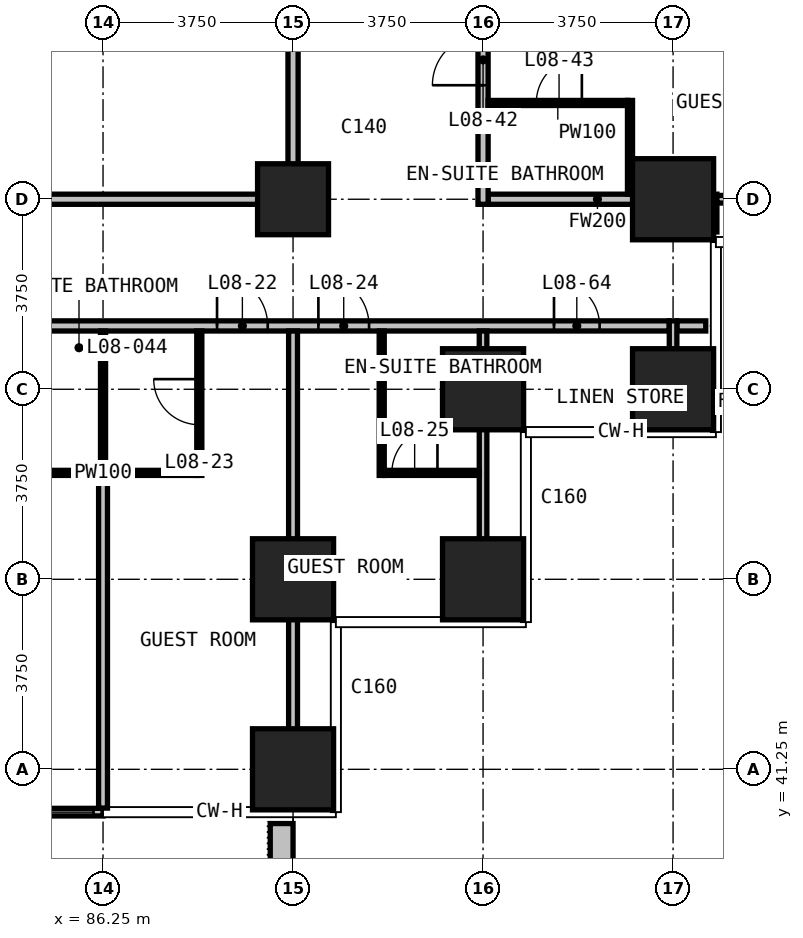
"""IFC4 building model, lengths in metres.
Left out: names, types, materials, properties, quantities, classifications, styles, units other than length and angle.
Written with IfcOpenShell. Run it as: python <this file> out.ifc"""

import sys

from ifc_helpers import new_model, si_unit, direction, frame, frame_2d, origin, origin_2d, place, context, subcontext, project, spatial, rectangle, extrude, element, fill, save


model = new_model("IFC4")
c1 = context("Model", 3, precision=1e-05, world=origin(), true_north=direction((0.0, 1.0)))
c2 = subcontext(c1, "Body", "Model", "MODEL_VIEW")
j1 = project(units=[si_unit("LENGTHUNIT", "METRE"), si_unit("PLANEANGLEUNIT", "RADIAN")], contexts=[c1])
p1 = place(None, origin())
s1 = spatial("IfcSite", under=j1, at=p1, CompositionType="ELEMENT")
p2 = place(p1, origin())
s2 = spatial("IfcBuilding", under=s1, at=p2, CompositionType="ELEMENT")
p3 = place(p2, frame((0.0, 0.0, 46.1)))
s3 = spatial("IfcBuildingStorey", under=s2, at=p3, CompositionType="ELEMENT", Elevation=46.1)
for number, where, z_axis, x_axis in (
    (1, (90.0, 41.25, 0.0), (0.0, 0.0, 1.0), (1.0, 0.0, 0.0)),
    (2, (90.0, 45.0, 0.0), (0.0, 0.0, 1.0), (1.0, 0.0, 0.0)),
):
    element("IfcColumn", number, at=place(p3, frame(where, z_axis=z_axis, x_axis=x_axis)), inside=s3, PredefinedType="COLUMN", context=c2, shape_type="SweptSolid", body=[
        extrude(rectangle(XDim=1.6, YDim=1.6, at=origin_2d()), origin(), (0.0, 0.0, 1.0), 3.3),
    ])
p4 = place(p3, frame((90.0, 52.5, 0.0), z_axis=(0.0, 0.0, 1.0), x_axis=(1.0, 0.0, 0.0)))
e3 = element("IfcColumn", 3, at=p4, inside=s3, PredefinedType="COLUMN", context=c2, shape_type="SweptSolid", body=[
    extrude(rectangle(XDim=1.4, YDim=1.4, at=origin_2d()), origin(), (0.0, 0.0, 1.0), 3.3),
])
for number, where, z_axis, x_axis in (
    (4, (93.75, 45.0, 0.0), (0.0, 0.0, 1.0), (1.0, 0.0, 0.0)),
    (5, (93.75, 48.75, 0.0), (0.0, 0.0, 1.0), (1.0, 0.0, 0.0)),
    (6, (97.5, 48.75, 0.0), (0.0, 0.0, 1.0), (1.0, 0.0, 0.0)),
    (7, (97.5, 52.5, 0.0), (0.0, 0.0, 1.0), (1.0, 0.0, 0.0)),
):
    element("IfcColumn", number, at=place(p3, frame(where, z_axis=z_axis, x_axis=x_axis)), inside=s3, PredefinedType="COLUMN", context=c2, shape_type="SweptSolid", body=[
        extrude(rectangle(XDim=1.6, YDim=1.6, at=origin_2d()), origin(), (0.0, 0.0, 1.0), 3.3),
    ])
p5 = place(p3, frame((82.5, 40.405, 0.0), z_axis=(0.0, 0.0, 1.0), x_axis=(1.0, 0.0, 0.0)))
e8 = element("IfcWall", 8, at=p5, inside=s3, PredefinedType="SOLIDWALL", context=c2, shape_type="SweptSolid", body=[
    extrude(rectangle(XDim=3.75, YDim=0.15, at=frame_2d((1.875, 0.0))), origin(), (0.0, 0.0, 1.0), 3.0),
])
p6 = place(p5, frame((1.275, 0.0, 0.0)))
e9 = element("IfcOpeningElement", 9, at=p6, cuts=e8, PredefinedType="OPENING", context=c2, shape_type="SweptSolid", body=[
    extrude(rectangle(XDim=1.2, YDim=2.4, at=frame_2d((0.6, 1.2))), frame((0.0, 0.085, 0.0), z_axis=(0.0, -1.0, 0.0), x_axis=(1.0, 0.0, 0.0)), (0.0, 0.0, 1.0), 0.17),
])
p7 = place(p5, frame((2.663, 0.0, 0.1)))
e10 = element("IfcOpeningElement", 10, at=p7, cuts=e8, PredefinedType="OPENING", context=c2, shape_type="SweptSolid", body=[
    extrude(rectangle(XDim=0.9, YDim=2.4, at=frame_2d((0.45, 1.2))), frame((0.0, 0.085, 0.0), z_axis=(0.0, -1.0, 0.0), x_axis=(1.0, 0.0, 0.0)), (0.0, 0.0, 1.0), 0.17),
])
p8 = place(p3, frame((89.775, 40.18, 0.0), z_axis=(0.0, 0.0, 1.0), x_axis=(0.0, -1.0, 0.0)))
e11 = element("IfcWall", 11, at=p8, inside=s3, PredefinedType="USERDEFINED", context=c2, shape_type="SweptSolid", body=[
    extrude(rectangle(XDim=2.33, YDim=0.45, at=frame_2d((1.165, 0.0))), origin(), (0.0, 0.0, 1.0), 1.1),
])
p9 = place(p3, frame((52.575, 50.0, 0.0), z_axis=(0.0, 0.0, 1.0), x_axis=(1.0, 0.0, 0.0)))
e12 = element("IfcWall", 12, at=p9, inside=s3, PredefinedType="PARTITIONING", context=c2, shape_type="SweptSolid", body=[
    extrude(rectangle(XDim=44.85, YDim=0.2, at=frame_2d((22.425, 0.0))), origin(), (0.0, 0.0, 1.0), 3.0),
])
p10 = place(p9, frame((5.925, 0.0, 0.0)))
e13 = element("IfcOpeningElement", 13, at=p10, cuts=e12, PredefinedType="OPENING", context=c2, shape_type="SweptSolid", body=[
    extrude(rectangle(XDim=1.0, YDim=2.2, at=frame_2d((0.5, 1.1))), frame((0.0, 0.11, 0.0), z_axis=(0.0, -1.0, 0.0), x_axis=(1.0, 0.0, 0.0)), (0.0, 0.0, 1.0), 0.22),
])
p11 = place(p9, frame((7.925, 0.0, 0.0)))
e14 = element("IfcOpeningElement", 14, at=p11, cuts=e12, PredefinedType="OPENING", context=c2, shape_type="SweptSolid", body=[
    extrude(rectangle(XDim=1.0, YDim=2.2, at=frame_2d((0.5, 1.1))), frame((0.0, 0.11, 0.0), z_axis=(0.0, -1.0, 0.0), x_axis=(1.0, 0.0, 0.0)), (0.0, 0.0, 1.0), 0.22),
])
p12 = place(p9, frame((13.425, 0.0, 0.0)))
e15 = element("IfcOpeningElement", 15, at=p12, cuts=e12, PredefinedType="OPENING", context=c2, shape_type="SweptSolid", body=[
    extrude(rectangle(XDim=1.0, YDim=2.2, at=frame_2d((0.5, 1.1))), frame((0.0, 0.11, 0.0), z_axis=(0.0, -1.0, 0.0), x_axis=(1.0, 0.0, 0.0)), (0.0, 0.0, 1.0), 0.22),
])
p13 = place(p9, frame((15.425, 0.0, 0.0)))
e16 = element("IfcOpeningElement", 16, at=p13, cuts=e12, PredefinedType="OPENING", context=c2, shape_type="SweptSolid", body=[
    extrude(rectangle(XDim=1.0, YDim=2.2, at=frame_2d((0.5, 1.1))), frame((0.0, 0.11, 0.0), z_axis=(0.0, -1.0, 0.0), x_axis=(1.0, 0.0, 0.0)), (0.0, 0.0, 1.0), 0.22),
])
p14 = place(p9, frame((20.925, 0.0, 0.0)))
e17 = element("IfcOpeningElement", 17, at=p14, cuts=e12, PredefinedType="OPENING", context=c2, shape_type="SweptSolid", body=[
    extrude(rectangle(XDim=1.0, YDim=2.2, at=frame_2d((0.5, 1.1))), frame((0.0, 0.11, 0.0), z_axis=(0.0, -1.0, 0.0), x_axis=(1.0, 0.0, 0.0)), (0.0, 0.0, 1.0), 0.22),
])
p15 = place(p9, frame((22.925, 0.0, 0.0)))
e18 = element("IfcOpeningElement", 18, at=p15, cuts=e12, PredefinedType="OPENING", context=c2, shape_type="SweptSolid", body=[
    extrude(rectangle(XDim=1.0, YDim=2.2, at=frame_2d((0.5, 1.1))), frame((0.0, 0.11, 0.0), z_axis=(0.0, -1.0, 0.0), x_axis=(1.0, 0.0, 0.0)), (0.0, 0.0, 1.0), 0.22),
])
p16 = place(p9, frame((28.425, 0.0, 0.0)))
e19 = element("IfcOpeningElement", 19, at=p16, cuts=e12, PredefinedType="OPENING", context=c2, shape_type="SweptSolid", body=[
    extrude(rectangle(XDim=1.0, YDim=2.2, at=frame_2d((0.5, 1.1))), frame((0.0, 0.11, 0.0), z_axis=(0.0, -1.0, 0.0), x_axis=(1.0, 0.0, 0.0)), (0.0, 0.0, 1.0), 0.22),
])
p17 = place(p9, frame((30.425, 0.0, 0.0)))
e20 = element("IfcOpeningElement", 20, at=p17, cuts=e12, PredefinedType="OPENING", context=c2, shape_type="SweptSolid", body=[
    extrude(rectangle(XDim=1.0, YDim=2.2, at=frame_2d((0.5, 1.1))), frame((0.0, 0.11, 0.0), z_axis=(0.0, -1.0, 0.0), x_axis=(1.0, 0.0, 0.0)), (0.0, 0.0, 1.0), 0.22),
])
p18 = place(p9, frame((35.925, 0.0, 0.0)))
e21 = element("IfcOpeningElement", 21, at=p18, cuts=e12, PredefinedType="OPENING", context=c2, shape_type="SweptSolid", body=[
    extrude(rectangle(XDim=1.0, YDim=2.2, at=frame_2d((0.5, 1.1))), frame((0.0, 0.11, 0.0), z_axis=(0.0, -1.0, 0.0), x_axis=(1.0, 0.0, 0.0)), (0.0, 0.0, 1.0), 0.22),
])
p19 = place(p9, frame((37.925, 0.0, 0.0)))
e22 = element("IfcOpeningElement", 22, at=p19, cuts=e12, PredefinedType="OPENING", context=c2, shape_type="SweptSolid", body=[
    extrude(rectangle(XDim=1.0, YDim=2.2, at=frame_2d((0.5, 1.1))), frame((0.0, 0.11, 0.0), z_axis=(0.0, -1.0, 0.0), x_axis=(1.0, 0.0, 0.0)), (0.0, 0.0, 1.0), 0.22),
])
p20 = place(p9, frame((1.4, 0.0, 0.0)))
e23 = element("IfcOpeningElement", 23, at=p20, cuts=e12, PredefinedType="OPENING", context=c2, shape_type="SweptSolid", body=[
    extrude(rectangle(XDim=0.9, YDim=2.2, at=frame_2d((0.45, 1.1))), frame((0.0, 0.11, 0.0), z_axis=(0.0, -1.0, 0.0), x_axis=(1.0, 0.0, 0.0)), (0.0, 0.0, 1.0), 0.22),
])
p21 = place(p9, frame((42.575, 0.0, 0.0)))
e24 = element("IfcOpeningElement", 24, at=p21, cuts=e12, PredefinedType="OPENING", context=c2, shape_type="SweptSolid", body=[
    extrude(rectangle(XDim=0.9, YDim=2.2, at=frame_2d((0.45, 1.1))), frame((0.0, 0.11, 0.0), z_axis=(0.0, -1.0, 0.0), x_axis=(1.0, 0.0, 0.0)), (0.0, 0.0, 1.0), 0.22),
])
p22 = place(p3, frame((97.575, 50.0, 0.0), z_axis=(0.0, 0.0, 1.0), x_axis=(1.0, 0.0, 0.0)))
e25 = element("IfcWall", 25, at=p22, inside=s3, PredefinedType="PARTITIONING", context=c2, shape_type="SweptSolid", body=[
    extrude(rectangle(XDim=0.57, YDim=0.2, at=frame_2d((0.285, 0.0))), origin(), (0.0, 0.0, 1.0), 3.0),
])
p23 = place(p3, frame((60.1, 52.5, 0.0), z_axis=(0.0, 0.0, 1.0), x_axis=(1.0, 0.0, 0.0)))
e26 = element("IfcWall", 26, at=p23, inside=s3, PredefinedType="PARTITIONING", context=c2, shape_type="SweptSolid", body=[
    extrude(rectangle(XDim=29.8, YDim=0.2, at=frame_2d((14.9, 0.0))), origin(), (0.0, 0.0, 1.0), 3.0),
])
p24 = place(p23, frame((10.65, 0.0, 0.0)))
e27 = element("IfcOpeningElement", 27, at=p24, cuts=e26, PredefinedType="OPENING", context=c2, shape_type="SweptSolid", body=[
    extrude(rectangle(XDim=1.0, YDim=2.2, at=frame_2d((0.5, 1.1))), frame((0.0, 0.11, 0.0), z_axis=(0.0, -1.0, 0.0), x_axis=(1.0, 0.0, 0.0)), (0.0, 0.0, 1.0), 0.22),
])
p25 = place(p23, frame((18.15, 0.0, 0.0)))
e28 = element("IfcOpeningElement", 28, at=p25, cuts=e26, PredefinedType="OPENING", context=c2, shape_type="SweptSolid", body=[
    extrude(rectangle(XDim=1.0, YDim=2.2, at=frame_2d((0.5, 1.1))), frame((0.0, 0.11, 0.0), z_axis=(0.0, -1.0, 0.0), x_axis=(1.0, 0.0, 0.0)), (0.0, 0.0, 1.0), 0.22),
])
p26 = place(p3, frame((93.85, 52.5, 0.0), z_axis=(0.0, 0.0, 1.0), x_axis=(1.0, 0.0, 0.0)))
e29 = element("IfcWall", 29, at=p26, inside=s3, PredefinedType="PARTITIONING", context=c2, shape_type="SweptSolid", body=[
    extrude(rectangle(XDim=4.315, YDim=0.2, at=frame_2d((2.157, 0.0))), origin(), (0.0, 0.0, 1.0), 3.0),
])
p27 = place(p3, frame((90.0, 52.4, 0.0), z_axis=(0.0, 0.0, 1.0), x_axis=(0.0, 1.0, 0.0)))
e30 = element("IfcWall", 30, at=p27, inside=s3, PredefinedType="PARTITIONING", context=c2, shape_type="SweptSolid", body=[
    extrude(rectangle(XDim=18.84, YDim=0.2, at=frame_2d((9.42, 0.0))), origin(), (0.0, 0.0, 1.0), 3.0),
])
p28 = place(p27, frame((3.35, 0.0, 0.0)))
e31 = element("IfcOpeningElement", 31, at=p28, cuts=e30, PredefinedType="OPENING", context=c2, shape_type="SweptSolid", body=[
    extrude(rectangle(XDim=1.0, YDim=2.2, at=frame_2d((0.5, 1.1))), frame((0.0, 0.11, 0.0), z_axis=(0.0, -1.0, 0.0), x_axis=(1.0, 0.0, 0.0)), (0.0, 0.0, 1.0), 0.22),
])
p29 = place(p27, frame((12.3, 0.0, 0.0)))
e32 = element("IfcOpeningElement", 32, at=p29, cuts=e30, PredefinedType="OPENING", context=c2, shape_type="SweptSolid", body=[
    extrude(rectangle(XDim=1.8, YDim=2.2, at=frame_2d((0.9, 1.1))), frame((0.0, 0.11, 0.0), z_axis=(0.0, -1.0, 0.0), x_axis=(1.0, 0.0, 0.0)), (0.0, 0.0, 1.0), 0.22),
])
p30 = place(p3, frame((93.75, 52.4, 0.0), z_axis=(0.0, 0.0, 1.0), x_axis=(0.0, 1.0, 0.0)))
e33 = element("IfcWall", 33, at=p30, inside=s3, PredefinedType="PARTITIONING", context=c2, shape_type="SweptSolid", body=[
    extrude(rectangle(XDim=33.925, YDim=0.2, at=frame_2d((16.962, 0.0))), origin(), (0.0, 0.0, 1.0), 3.0),
])
p31 = place(p30, frame((2.35, 0.0, 0.0)))
e34 = element("IfcOpeningElement", 34, at=p31, cuts=e33, PredefinedType="OPENING", context=c2, shape_type="SweptSolid", body=[
    extrude(rectangle(XDim=1.0, YDim=2.2, at=frame_2d((0.5, 1.1))), frame((0.0, 0.11, 0.0), z_axis=(0.0, -1.0, 0.0), x_axis=(1.0, 0.0, 0.0)), (0.0, 0.0, 1.0), 0.22),
])
p32 = place(p30, frame((4.35, 0.0, 0.0)))
e35 = element("IfcOpeningElement", 35, at=p32, cuts=e33, PredefinedType="OPENING", context=c2, shape_type="SweptSolid", body=[
    extrude(rectangle(XDim=1.0, YDim=2.2, at=frame_2d((0.5, 1.1))), frame((0.0, 0.11, 0.0), z_axis=(0.0, -1.0, 0.0), x_axis=(1.0, 0.0, 0.0)), (0.0, 0.0, 1.0), 0.22),
])
p33 = place(p30, frame((9.85, 0.0, 0.0)))
e36 = element("IfcOpeningElement", 36, at=p33, cuts=e33, PredefinedType="OPENING", context=c2, shape_type="SweptSolid", body=[
    extrude(rectangle(XDim=1.0, YDim=2.2, at=frame_2d((0.5, 1.1))), frame((0.0, 0.11, 0.0), z_axis=(0.0, -1.0, 0.0), x_axis=(1.0, 0.0, 0.0)), (0.0, 0.0, 1.0), 0.22),
])
p34 = place(p30, frame((11.85, 0.0, 0.0)))
e37 = element("IfcOpeningElement", 37, at=p34, cuts=e33, PredefinedType="OPENING", context=c2, shape_type="SweptSolid", body=[
    extrude(rectangle(XDim=1.0, YDim=2.2, at=frame_2d((0.5, 1.1))), frame((0.0, 0.11, 0.0), z_axis=(0.0, -1.0, 0.0), x_axis=(1.0, 0.0, 0.0)), (0.0, 0.0, 1.0), 0.22),
])
p35 = place(p30, frame((17.35, 0.0, 0.0)))
e38 = element("IfcOpeningElement", 38, at=p35, cuts=e33, PredefinedType="OPENING", context=c2, shape_type="SweptSolid", body=[
    extrude(rectangle(XDim=1.0, YDim=2.2, at=frame_2d((0.5, 1.1))), frame((0.0, 0.11, 0.0), z_axis=(0.0, -1.0, 0.0), x_axis=(1.0, 0.0, 0.0)), (0.0, 0.0, 1.0), 0.22),
])
p36 = place(p30, frame((19.35, 0.0, 0.0)))
e39 = element("IfcOpeningElement", 39, at=p36, cuts=e33, PredefinedType="OPENING", context=c2, shape_type="SweptSolid", body=[
    extrude(rectangle(XDim=1.0, YDim=2.2, at=frame_2d((0.5, 1.1))), frame((0.0, 0.11, 0.0), z_axis=(0.0, -1.0, 0.0), x_axis=(1.0, 0.0, 0.0)), (0.0, 0.0, 1.0), 0.22),
])
p37 = place(p30, frame((24.85, 0.0, 0.0)))
e40 = element("IfcOpeningElement", 40, at=p37, cuts=e33, PredefinedType="OPENING", context=c2, shape_type="SweptSolid", body=[
    extrude(rectangle(XDim=1.0, YDim=2.2, at=frame_2d((0.5, 1.1))), frame((0.0, 0.11, 0.0), z_axis=(0.0, -1.0, 0.0), x_axis=(1.0, 0.0, 0.0)), (0.0, 0.0, 1.0), 0.22),
])
p38 = place(p30, frame((26.85, 0.0, 0.0)))
e41 = element("IfcOpeningElement", 41, at=p38, cuts=e33, PredefinedType="OPENING", context=c2, shape_type="SweptSolid", body=[
    extrude(rectangle(XDim=1.0, YDim=2.2, at=frame_2d((0.5, 1.1))), frame((0.0, 0.11, 0.0), z_axis=(0.0, -1.0, 0.0), x_axis=(1.0, 0.0, 0.0)), (0.0, 0.0, 1.0), 0.22),
])
p39 = place(p30, frame((31.55, 0.0, 0.0)))
e42 = element("IfcOpeningElement", 42, at=p39, cuts=e33, PredefinedType="OPENING", context=c2, shape_type="SweptSolid", body=[
    extrude(rectangle(XDim=0.9, YDim=2.2, at=frame_2d((0.45, 1.1))), frame((0.0, 0.11, 0.0), z_axis=(0.0, -1.0, 0.0), x_axis=(1.0, 0.0, 0.0)), (0.0, 0.0, 1.0), 0.22),
])
p40 = place(p3, frame((98.265, 51.855, 0.0), z_axis=(0.0, 0.0, 1.0), x_axis=(0.0, 1.0, 0.0)))
e43 = element("IfcWall", 43, at=p40, inside=s3, PredefinedType="PARTITIONING", context=c2, shape_type="SweptSolid", body=[
    extrude(rectangle(XDim=0.745, YDim=0.2, at=frame_2d((0.373, 0.0))), origin(), (0.0, 0.0, 1.0), 3.0),
])
p41 = place(p3, frame((86.25, 40.485, 0.0), z_axis=(0.0, 0.0, 1.0), x_axis=(0.0, 1.0, 0.0)))
e44 = element("IfcWall", 44, at=p41, inside=s3, PredefinedType="PARTITIONING", context=c2, shape_type="SweptSolid", body=[
    extrude(rectangle(XDim=6.565, YDim=0.175, at=frame_2d((3.282, 0.0))), origin(), (0.0, 0.0, 1.0), 3.0),
])
p42 = place(p3, frame((90.0, 40.485, 0.0), z_axis=(0.0, 0.0, 1.0), x_axis=(0.0, 1.0, 0.0)))
e45 = element("IfcWall", 45, at=p42, inside=s3, PredefinedType="PARTITIONING", context=c2, shape_type="SweptSolid", body=[
    extrude(rectangle(XDim=9.415, YDim=0.175, at=frame_2d((4.708, 0.0))), origin(), (0.0, 0.0, 1.0), 3.0),
])
p43 = place(p3, frame((98.365, 52.5, 0.0), z_axis=(0.0, 0.0, 1.0), x_axis=(1.0, 0.0, 0.0)))
e46 = element("IfcWall", 46, at=p43, inside=s3, PredefinedType="PARTITIONING", context=c2, shape_type="SweptSolid", body=[
    extrude(rectangle(XDim=3.53, YDim=0.15, at=frame_2d((1.765, 0.0))), origin(), (0.0, 0.0, 1.0), 3.0),
])
p44 = place(p3, frame((93.75, 44.235, 0.0), z_axis=(0.0, 0.0, 1.0), x_axis=(0.0, 1.0, 0.0)))
e47 = element("IfcWall", 47, at=p44, inside=s3, PredefinedType="PARTITIONING", context=c2, shape_type="SweptSolid", body=[
    extrude(rectangle(XDim=5.665, YDim=0.15, at=frame_2d((2.833, 0.0))), origin(), (0.0, 0.0, 1.0), 3.0),
])
p45 = place(p3, frame((97.5, 48.105, 0.0), z_axis=(0.0, 0.0, 1.0), x_axis=(0.0, 1.0, 0.0)))
e48 = element("IfcWall", 48, at=p45, inside=s3, PredefinedType="PARTITIONING", context=c2, shape_type="SweptSolid", body=[
    extrude(rectangle(XDim=1.995, YDim=0.15, at=frame_2d((0.998, 0.0))), origin(), (0.0, 0.0, 1.0), 3.0),
])
p46 = place(p3, frame((84.4, 47.1, 0.0), z_axis=(0.0, 0.0, 1.0), x_axis=(1.0, 0.0, 0.0)))
e49 = element("IfcWall", 49, at=p46, inside=s3, PredefinedType="PARTITIONING", context=c2, shape_type="SweptSolid", body=[
    extrude(rectangle(XDim=3.7, YDim=0.1, at=frame_2d((1.85, 0.0))), origin(), (0.0, 0.0, 1.0), 3.0),
])
p47 = place(p3, frame((91.8, 47.1, 0.0), z_axis=(0.0, 0.0, 1.0), x_axis=(1.0, 0.0, 0.0)))
e50 = element("IfcWall", 50, at=p47, inside=s3, PredefinedType="PARTITIONING", context=c2, shape_type="SweptSolid", body=[
    extrude(rectangle(XDim=1.875, YDim=0.1, at=frame_2d((0.938, 0.0))), origin(), (0.0, 0.0, 1.0), 3.0),
])
p48 = place(p47, frame((0.15, 0.0, 0.0)))
e51 = element("IfcOpeningElement", 51, at=p48, cuts=e50, PredefinedType="OPENING", context=c2, shape_type="SweptSolid", body=[
    extrude(rectangle(XDim=0.9, YDim=2.2, at=frame_2d((0.45, 1.1))), frame((0.0, 0.06, 0.0), z_axis=(0.0, -1.0, 0.0), x_axis=(1.0, 0.0, 0.0)), (0.0, 0.0, 1.0), 0.12),
])
p49 = place(p3, frame((93.85, 54.4, 0.0), z_axis=(0.0, 0.0, 1.0), x_axis=(1.0, 0.0, 0.0)))
e52 = element("IfcWall", 52, at=p49, inside=s3, PredefinedType="PARTITIONING", context=c2, shape_type="SweptSolid", body=[
    extrude(rectangle(XDim=2.75, YDim=0.1, at=frame_2d((1.375, 0.0))), origin(), (0.0, 0.0, 1.0), 3.0),
])
p50 = place(p49, frame((0.95, 0.0, 0.0)))
e53 = element("IfcOpeningElement", 53, at=p50, cuts=e52, PredefinedType="OPENING", context=c2, shape_type="SweptSolid", body=[
    extrude(rectangle(XDim=0.9, YDim=2.2, at=frame_2d((0.45, 1.1))), frame((0.0, 0.06, 0.0), z_axis=(0.0, -1.0, 0.0), x_axis=(1.0, 0.0, 0.0)), (0.0, 0.0, 1.0), 0.12),
])
p51 = place(p3, frame((86.25, 47.15, 0.0), z_axis=(0.0, 0.0, 1.0), x_axis=(0.0, 1.0, 0.0)))
e54 = element("IfcWall", 54, at=p51, inside=s3, PredefinedType="PARTITIONING", context=c2, shape_type="SweptSolid", body=[
    extrude(rectangle(XDim=2.75, YDim=0.1, at=frame_2d((1.375, 0.0))), origin(), (0.0, 0.0, 1.0), 3.0),
])
p52 = place(p3, frame((88.15, 47.05, 0.0), z_axis=(0.0, 0.0, 1.0), x_axis=(0.0, 1.0, 0.0)))
e55 = element("IfcWall", 55, at=p52, inside=s3, PredefinedType="PARTITIONING", context=c2, shape_type="SweptSolid", body=[
    extrude(rectangle(XDim=2.85, YDim=0.1, at=frame_2d((1.425, 0.0))), origin(), (0.0, 0.0, 1.0), 3.0),
])
p53 = place(p52, frame((1.0, 0.0, 0.0)))
e56 = element("IfcOpeningElement", 56, at=p53, cuts=e55, PredefinedType="OPENING", context=c2, shape_type="SweptSolid", body=[
    extrude(rectangle(XDim=0.9, YDim=2.2, at=frame_2d((0.45, 1.1))), frame((0.0, 0.06, 0.0), z_axis=(0.0, -1.0, 0.0), x_axis=(1.0, 0.0, 0.0)), (0.0, 0.0, 1.0), 0.12),
])
p54 = place(p3, frame((91.75, 47.05, 0.0), z_axis=(0.0, 0.0, 1.0), x_axis=(0.0, 1.0, 0.0)))
e57 = element("IfcWall", 57, at=p54, inside=s3, PredefinedType="PARTITIONING", context=c2, shape_type="SweptSolid", body=[
    extrude(rectangle(XDim=2.85, YDim=0.1, at=frame_2d((1.425, 0.0))), origin(), (0.0, 0.0, 1.0), 3.0),
])
p55 = place(p3, frame((96.65, 52.6, 0.0), z_axis=(0.0, 0.0, 1.0), x_axis=(0.0, 1.0, 0.0)))
e58 = element("IfcWall", 58, at=p55, inside=s3, PredefinedType="PARTITIONING", context=c2, shape_type="SweptSolid", body=[
    extrude(rectangle(XDim=1.85, YDim=0.1, at=frame_2d((0.925, 0.0))), origin(), (0.0, 0.0, 1.0), 3.0),
])
p56 = place(p7, origin())
e59 = element("IfcWindow", 59, at=p56, inside=s3, PartitioningType="SINGLE_PANEL", PredefinedType="WINDOW", context=c2, shape_type="SweptSolid", body=[
    extrude(rectangle(XDim=0.9, YDim=2.4, at=frame_2d((0.45, 1.2))), frame((0.0, 0.03, 0.0), z_axis=(0.0, -1.0, 0.0), x_axis=(1.0, 0.0, 0.0)), (0.0, 0.0, 1.0), 0.06),
])
fill(e10, e59)
p57 = place(p18, origin())
e60 = element("IfcDoor", 60, at=p57, inside=s3, OperationType="SINGLE_SWING_RIGHT", PredefinedType="DOOR", context=c2, shape_type="SweptSolid", body=[
    extrude(rectangle(XDim=1.0, YDim=2.2, at=frame_2d((0.5, 1.1))), frame((0.0, 0.025, 0.0), z_axis=(0.0, -1.0, 0.0), x_axis=(1.0, 0.0, 0.0)), (0.0, 0.0, 1.0), 0.05),
])
fill(e21, e60)
p58 = place(p53, origin())
e61 = element("IfcDoor", 61, at=p58, inside=s3, OperationType="SINGLE_SWING_RIGHT", PredefinedType="DOOR", context=c2, shape_type="SweptSolid", body=[
    extrude(rectangle(XDim=0.9, YDim=2.2, at=frame_2d((0.45, 1.1))), frame((0.0, 0.025, 0.0), z_axis=(0.0, -1.0, 0.0), x_axis=(1.0, 0.0, 0.0)), (0.0, 0.0, 1.0), 0.05),
])
fill(e56, e61)
p59 = place(p19, origin())
e62 = element("IfcDoor", 62, at=p59, inside=s3, OperationType="SINGLE_SWING_LEFT", PredefinedType="DOOR", context=c2, shape_type="SweptSolid", body=[
    extrude(rectangle(XDim=1.0, YDim=2.2, at=frame_2d((0.5, 1.1))), frame((0.0, 0.025, 0.0), z_axis=(0.0, -1.0, 0.0), x_axis=(1.0, 0.0, 0.0)), (0.0, 0.0, 1.0), 0.05),
])
fill(e22, e62)
p60 = place(p48, origin())
e63 = element("IfcDoor", 63, at=p60, inside=s3, OperationType="SINGLE_SWING_RIGHT", PredefinedType="DOOR", context=c2, shape_type="SweptSolid", body=[
    extrude(rectangle(XDim=0.9, YDim=2.2, at=frame_2d((0.45, 1.1))), frame((0.0, 0.025, 0.0), z_axis=(0.0, -1.0, 0.0), x_axis=(1.0, 0.0, 0.0)), (0.0, 0.0, 1.0), 0.05),
])
fill(e51, e63)
p61 = place(p31, origin())
e64 = element("IfcDoor", 64, at=p61, inside=s3, OperationType="SINGLE_SWING_LEFT", PredefinedType="DOOR", context=c2, shape_type="SweptSolid", body=[
    extrude(rectangle(XDim=1.0, YDim=2.2, at=frame_2d((0.5, 1.1))), frame((0.0, 0.025, 0.0), z_axis=(0.0, -1.0, 0.0), x_axis=(1.0, 0.0, 0.0)), (0.0, 0.0, 1.0), 0.05),
])
fill(e34, e64)
p62 = place(p50, origin())
e65 = element("IfcDoor", 65, at=p62, inside=s3, OperationType="SINGLE_SWING_RIGHT", PredefinedType="DOOR", context=c2, shape_type="SweptSolid", body=[
    extrude(rectangle(XDim=0.9, YDim=2.2, at=frame_2d((0.45, 1.1))), frame((0.0, 0.025, 0.0), z_axis=(0.0, -1.0, 0.0), x_axis=(1.0, 0.0, 0.0)), (0.0, 0.0, 1.0), 0.05),
])
fill(e53, e65)
p63 = place(p21, origin())
e66 = element("IfcDoor", 66, at=p63, inside=s3, OperationType="SINGLE_SWING_LEFT", PredefinedType="DOOR", context=c2, shape_type="SweptSolid", body=[
    extrude(rectangle(XDim=0.9, YDim=2.2, at=frame_2d((0.45, 1.1))), frame((0.0, 0.025, 0.0), z_axis=(0.0, -1.0, 0.0), x_axis=(1.0, 0.0, 0.0)), (0.0, 0.0, 1.0), 0.05),
])
fill(e24, e66)
save(model, sys.argv[1])
